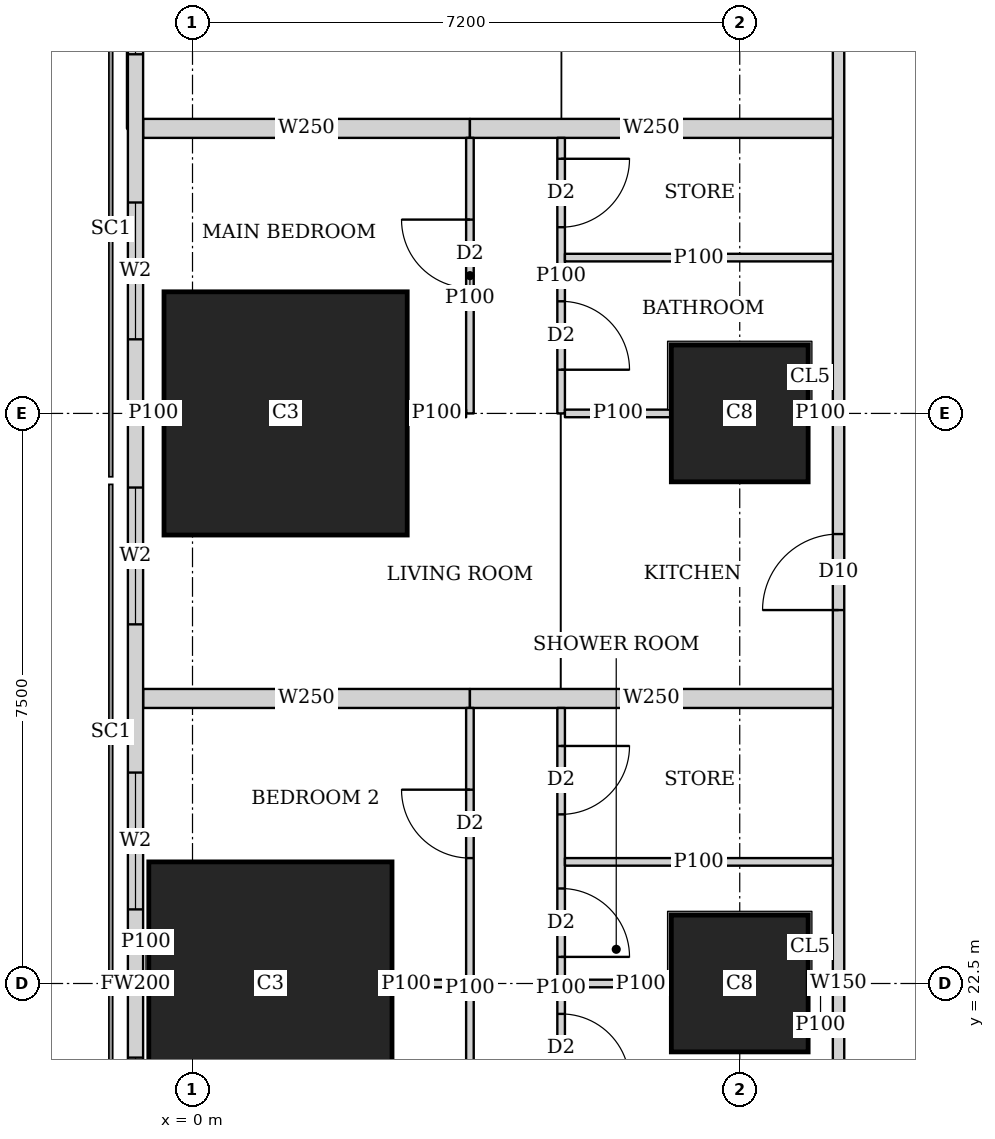
"""IFC4 building model, lengths in metres.
Left out: names, types, materials, properties, quantities, classifications, styles, units other than length and angle.
Written with IfcOpenShell. Run it as: python <this file> out.ifc"""

import sys

from ifc_helpers import new_model, si_unit, direction, frame, frame_2d, origin, origin_2d, place, context, subcontext, project, spatial, rectangle, extrude, element, fill, save


model = new_model("IFC4")
c1 = context("Model", 3, precision=1e-05, world=origin(), true_north=direction((0.0, 1.0)))
c2 = subcontext(c1, "Body", "Model", "MODEL_VIEW")
j1 = project(units=[si_unit("LENGTHUNIT", "METRE"), si_unit("PLANEANGLEUNIT", "RADIAN")], contexts=[c1])
p1 = place(None, origin())
s1 = spatial("IfcSite", under=j1, at=p1, CompositionType="ELEMENT")
p2 = place(p1, origin())
s2 = spatial("IfcBuilding", under=s1, at=p2, CompositionType="ELEMENT")
p3 = place(p2, frame((0.0, 0.0, 23.75)))
s3 = spatial("IfcBuildingStorey", under=s2, at=p3, CompositionType="ELEMENT", Elevation=23.75)
p4 = place(p3, frame((1.025, 22.5, 0.0), z_axis=(0.0, 0.0, 1.0), x_axis=(1.0, 0.0, 0.0)))
e1 = element("IfcColumn", 1, at=p4, inside=s3, PredefinedType="COLUMN", context=c2, shape_type="SweptSolid", body=[
    extrude(rectangle(XDim=3.2, YDim=3.2, at=origin_2d()), origin(), (0.0, 0.0, 1.0), 3.75),
])
p5 = place(p3, frame((7.2, 22.5, 0.0), z_axis=(0.0, 0.0, 1.0), x_axis=(1.0, 0.0, 0.0)))
e2 = element("IfcColumn", 2, at=p5, inside=s3, PredefinedType="COLUMN", context=c2, shape_type="SweptSolid", body=[
    extrude(rectangle(XDim=1.8, YDim=1.8, at=origin_2d()), origin(), (0.0, 0.0, 1.0), 3.75),
])
p6 = place(p3, frame((1.225, 30.0, 0.0), z_axis=(0.0, 0.0, 1.0), x_axis=(1.0, 0.0, 0.0)))
e3 = element("IfcColumn", 3, at=p6, inside=s3, PredefinedType="COLUMN", context=c2, shape_type="SweptSolid", body=[
    extrude(rectangle(XDim=3.2, YDim=3.2, at=origin_2d()), origin(), (0.0, 0.0, 1.0), 3.75),
])
p7 = place(p3, frame((7.2, 30.0, 0.0), z_axis=(0.0, 0.0, 1.0), x_axis=(1.0, 0.0, 0.0)))
e4 = element("IfcColumn", 4, at=p7, inside=s3, PredefinedType="COLUMN", context=c2, shape_type="SweptSolid", body=[
    extrude(rectangle(XDim=1.8, YDim=1.8, at=origin_2d()), origin(), (0.0, 0.0, 1.0), 3.75),
])
p8 = place(p3, frame((-0.75, 42.837, 0.0), z_axis=(0.0, 0.0, 1.0), x_axis=(0.0, -1.0, 0.0)))
e5 = element("IfcWall", 5, at=p8, inside=s3, PredefinedType="SOLIDWALL", context=c2, shape_type="SweptSolid", body=[
    extrude(rectangle(XDim=40.674, YDim=0.2, at=frame_2d((20.337, 0.0))), origin(), (0.0, 0.0, 1.0), 3.5),
])
p9 = place(p8, frame((1.78, 0.0, 0.9)))
e6 = element("IfcOpeningElement", 6, at=p9, cuts=e5, PredefinedType="OPENING", context=c2, shape_type="SweptSolid", body=[
    extrude(rectangle(XDim=1.8, YDim=1.5, at=frame_2d((0.9, 0.75))), frame((0.0, 0.11, 0.0), z_axis=(0.0, -1.0, 0.0), x_axis=(1.0, 0.0, 0.0)), (0.0, 0.0, 1.0), 0.22),
])
p10 = place(p8, frame((6.312, 0.0, 0.9)))
e7 = element("IfcOpeningElement", 7, at=p10, cuts=e5, PredefinedType="OPENING", context=c2, shape_type="SweptSolid", body=[
    extrude(rectangle(XDim=1.8, YDim=1.5, at=frame_2d((0.9, 0.75))), frame((0.0, 0.11, 0.0), z_axis=(0.0, -1.0, 0.0), x_axis=(1.0, 0.0, 0.0)), (0.0, 0.0, 1.0), 0.22),
])
p11 = place(p8, frame((10.062, 0.0, 0.9)))
e8 = element("IfcOpeningElement", 8, at=p11, cuts=e5, PredefinedType="OPENING", context=c2, shape_type="SweptSolid", body=[
    extrude(rectangle(XDim=1.8, YDim=1.5, at=frame_2d((0.9, 0.75))), frame((0.0, 0.11, 0.0), z_axis=(0.0, -1.0, 0.0), x_axis=(1.0, 0.0, 0.0)), (0.0, 0.0, 1.0), 0.22),
])
p12 = place(p8, frame((13.812, 0.0, 0.9)))
e9 = element("IfcOpeningElement", 9, at=p12, cuts=e5, PredefinedType="OPENING", context=c2, shape_type="SweptSolid", body=[
    extrude(rectangle(XDim=1.8, YDim=1.5, at=frame_2d((0.9, 0.75))), frame((0.0, 0.11, 0.0), z_axis=(0.0, -1.0, 0.0), x_axis=(1.0, 0.0, 0.0)), (0.0, 0.0, 1.0), 0.22),
])
p13 = place(p8, frame((17.562, 0.0, 0.9)))
e10 = element("IfcOpeningElement", 10, at=p13, cuts=e5, PredefinedType="OPENING", context=c2, shape_type="SweptSolid", body=[
    extrude(rectangle(XDim=1.8, YDim=1.5, at=frame_2d((0.9, 0.75))), frame((0.0, 0.11, 0.0), z_axis=(0.0, -1.0, 0.0), x_axis=(1.0, 0.0, 0.0)), (0.0, 0.0, 1.0), 0.22),
])
p14 = place(p8, frame((21.312, 0.0, 0.9)))
e11 = element("IfcOpeningElement", 11, at=p14, cuts=e5, PredefinedType="OPENING", context=c2, shape_type="SweptSolid", body=[
    extrude(rectangle(XDim=1.8, YDim=1.5, at=frame_2d((0.9, 0.75))), frame((0.0, 0.11, 0.0), z_axis=(0.0, -1.0, 0.0), x_axis=(1.0, 0.0, 0.0)), (0.0, 0.0, 1.0), 0.22),
])
p15 = place(p8, frame((25.062, 0.0, 0.9)))
e12 = element("IfcOpeningElement", 12, at=p15, cuts=e5, PredefinedType="OPENING", context=c2, shape_type="SweptSolid", body=[
    extrude(rectangle(XDim=1.8, YDim=1.5, at=frame_2d((0.9, 0.75))), frame((0.0, 0.11, 0.0), z_axis=(0.0, -1.0, 0.0), x_axis=(1.0, 0.0, 0.0)), (0.0, 0.0, 1.0), 0.22),
])
p16 = place(p8, frame((28.812, 0.0, 0.9)))
e13 = element("IfcOpeningElement", 13, at=p16, cuts=e5, PredefinedType="OPENING", context=c2, shape_type="SweptSolid", body=[
    extrude(rectangle(XDim=1.8, YDim=1.5, at=frame_2d((0.9, 0.75))), frame((0.0, 0.11, 0.0), z_axis=(0.0, -1.0, 0.0), x_axis=(1.0, 0.0, 0.0)), (0.0, 0.0, 1.0), 0.22),
])
p17 = place(p8, frame((32.562, 0.0, 0.9)))
e14 = element("IfcOpeningElement", 14, at=p17, cuts=e5, PredefinedType="OPENING", context=c2, shape_type="SweptSolid", body=[
    extrude(rectangle(XDim=1.8, YDim=1.5, at=frame_2d((0.9, 0.75))), frame((0.0, 0.11, 0.0), z_axis=(0.0, -1.0, 0.0), x_axis=(1.0, 0.0, 0.0)), (0.0, 0.0, 1.0), 0.22),
])
p18 = place(p8, frame((37.094, 0.0, 0.9)))
e15 = element("IfcOpeningElement", 15, at=p18, cuts=e5, PredefinedType="OPENING", context=c2, shape_type="SweptSolid", body=[
    extrude(rectangle(XDim=1.8, YDim=1.5, at=frame_2d((0.9, 0.75))), frame((0.0, 0.11, 0.0), z_axis=(0.0, -1.0, 0.0), x_axis=(1.0, 0.0, 0.0)), (0.0, 0.0, 1.0), 0.22),
])
p19 = place(p3, frame((8.5, 2.626, 0.0), z_axis=(0.0, 0.0, 1.0), x_axis=(0.0, 1.0, 0.0)))
e16 = element("IfcWall", 16, at=p19, inside=s3, PredefinedType="SOLIDWALL", context=c2, shape_type="SweptSolid", body=[
    extrude(rectangle(XDim=39.773, YDim=0.15, at=frame_2d((19.886, 0.0))), origin(), (0.0, 0.0, 1.0), 2.05),
])
p20 = place(p19, frame((9.786, 0.0, 0.0)))
e17 = element("IfcOpeningElement", 17, at=p20, cuts=e16, PredefinedType="OPENING", context=c2, shape_type="SweptSolid", body=[
    extrude(rectangle(XDim=1.0, YDim=2.0, at=frame_2d((0.5, 1.0))), frame((0.0, 0.085, 0.0), z_axis=(0.0, -1.0, 0.0), x_axis=(1.0, 0.0, 0.0)), (0.0, 0.0, 1.0), 0.17),
])
p21 = place(p19, frame((13.961, 0.0, 0.0)))
e18 = element("IfcOpeningElement", 18, at=p21, cuts=e16, PredefinedType="OPENING", context=c2, shape_type="SweptSolid", body=[
    extrude(rectangle(XDim=1.0, YDim=2.0, at=frame_2d((0.5, 1.0))), frame((0.0, 0.085, 0.0), z_axis=(0.0, -1.0, 0.0), x_axis=(1.0, 0.0, 0.0)), (0.0, 0.0, 1.0), 0.17),
])
p22 = place(p19, frame((24.787, 0.0, 0.0)))
e19 = element("IfcOpeningElement", 19, at=p22, cuts=e16, PredefinedType="OPENING", context=c2, shape_type="SweptSolid", body=[
    extrude(rectangle(XDim=1.0, YDim=2.0, at=frame_2d((0.5, 1.0))), frame((0.0, 0.085, 0.0), z_axis=(0.0, -1.0, 0.0), x_axis=(1.0, 0.0, 0.0)), (0.0, 0.0, 1.0), 0.17),
])
p23 = place(p19, frame((32.287, 0.0, 0.0)))
e20 = element("IfcOpeningElement", 20, at=p23, cuts=e16, PredefinedType="OPENING", context=c2, shape_type="SweptSolid", body=[
    extrude(rectangle(XDim=1.0, YDim=2.0, at=frame_2d((0.5, 1.0))), frame((0.0, 0.085, 0.0), z_axis=(0.0, -1.0, 0.0), x_axis=(1.0, 0.0, 0.0)), (0.0, 0.0, 1.0), 0.17),
])
p24 = place(p3, frame((3.65, 18.75, 0.0), z_axis=(0.0, 0.0, 1.0), x_axis=(0.0, 1.0, 0.0)))
e21 = element("IfcWall", 21, at=p24, inside=s3, PredefinedType="PARTITIONING", context=c2, shape_type="SweptSolid", body=[
    extrude(rectangle(XDim=7.375, YDim=0.1, at=frame_2d((3.688, 0.0))), origin(), (0.0, 0.0, 1.0), 3.5),
])
p25 = place(p24, frame((0.2, 0.0, 0.0)))
e22 = element("IfcOpeningElement", 22, at=p25, cuts=e21, PredefinedType="OPENING", context=c2, shape_type="SweptSolid", body=[
    extrude(rectangle(XDim=0.9, YDim=2.1, at=frame_2d((0.45, 1.05))), frame((0.0, 0.06, 0.0), z_axis=(0.0, -1.0, 0.0), x_axis=(1.0, 0.0, 0.0)), (0.0, 0.0, 1.0), 0.12),
])
p26 = place(p24, frame((5.4, 0.0, 0.0)))
e23 = element("IfcOpeningElement", 23, at=p26, cuts=e21, PredefinedType="OPENING", context=c2, shape_type="SweptSolid", body=[
    extrude(rectangle(XDim=0.9, YDim=2.1, at=frame_2d((0.45, 1.05))), frame((0.0, 0.06, 0.0), z_axis=(0.0, -1.0, 0.0), x_axis=(1.0, 0.0, 0.0)), (0.0, 0.0, 1.0), 0.12),
])
p27 = place(p3, frame((4.85, 18.75, 0.0), z_axis=(0.0, 0.0, 1.0), x_axis=(0.0, 1.0, 0.0)))
e24 = element("IfcWall", 24, at=p27, inside=s3, PredefinedType="PARTITIONING", context=c2, shape_type="SweptSolid", body=[
    extrude(rectangle(XDim=7.375, YDim=0.1, at=frame_2d((3.688, 0.0))), origin(), (0.0, 0.0, 1.0), 3.5),
])
p28 = place(p27, frame((0.575, 0.0, 0.0)))
e25 = element("IfcOpeningElement", 25, at=p28, cuts=e24, PredefinedType="OPENING", context=c2, shape_type="SweptSolid", body=[
    extrude(rectangle(XDim=0.9, YDim=2.1, at=frame_2d((0.45, 1.05))), frame((0.0, 0.06, 0.0), z_axis=(0.0, -1.0, 0.0), x_axis=(1.0, 0.0, 0.0)), (0.0, 0.0, 1.0), 0.12),
])
p29 = place(p27, frame((4.1, 0.0, 0.0)))
e26 = element("IfcOpeningElement", 26, at=p29, cuts=e24, PredefinedType="OPENING", context=c2, shape_type="SweptSolid", body=[
    extrude(rectangle(XDim=0.9, YDim=2.1, at=frame_2d((0.45, 1.05))), frame((0.0, 0.06, 0.0), z_axis=(0.0, -1.0, 0.0), x_axis=(1.0, 0.0, 0.0)), (0.0, 0.0, 1.0), 0.12),
])
p30 = place(p27, frame((2.45, 0.0, 0.0)))
e27 = element("IfcOpeningElement", 27, at=p30, cuts=e24, PredefinedType="OPENING", context=c2, shape_type="SweptSolid", body=[
    extrude(rectangle(XDim=0.9, YDim=2.1, at=frame_2d((0.45, 1.05))), frame((0.0, 0.06, 0.0), z_axis=(0.0, -1.0, 0.0), x_axis=(1.0, 0.0, 0.0)), (0.0, 0.0, 1.0), 0.12),
])
p31 = place(p27, frame((5.975, 0.0, 0.0)))
e28 = element("IfcOpeningElement", 28, at=p31, cuts=e24, PredefinedType="OPENING", context=c2, shape_type="SweptSolid", body=[
    extrude(rectangle(XDim=0.9, YDim=2.1, at=frame_2d((0.45, 1.05))), frame((0.0, 0.06, 0.0), z_axis=(0.0, -1.0, 0.0), x_axis=(1.0, 0.0, 0.0)), (0.0, 0.0, 1.0), 0.12),
])
p32 = place(p3, frame((-0.65, 22.5, 0.0), z_axis=(0.0, 0.0, 1.0), x_axis=(1.0, 0.0, 0.0)))
e29 = element("IfcWall", 29, at=p32, inside=s3, PredefinedType="PARTITIONING", context=c2, shape_type="SweptSolid", body=[
    extrude(rectangle(XDim=0.074, YDim=0.1, at=frame_2d((0.037, 0.0))), origin(), (0.0, 0.0, 1.0), 3.5),
])
p33 = place(p3, frame((2.626, 22.5, 0.0), z_axis=(0.0, 0.0, 1.0), x_axis=(1.0, 0.0, 0.0)))
e30 = element("IfcWall", 30, at=p33, inside=s3, PredefinedType="PARTITIONING", context=c2, shape_type="SweptSolid", body=[
    extrude(rectangle(XDim=0.974, YDim=0.1, at=frame_2d((0.487, 0.0))), origin(), (0.0, 0.0, 1.0), 3.5),
])
p34 = place(p3, frame((4.9, 22.5, 0.0), z_axis=(0.0, 0.0, 1.0), x_axis=(1.0, 0.0, 0.0)))
e31 = element("IfcWall", 31, at=p34, inside=s3, PredefinedType="PARTITIONING", context=c2, shape_type="SweptSolid", body=[
    extrude(rectangle(XDim=1.399, YDim=0.1, at=frame_2d((0.7, 0.0))), origin(), (0.0, 0.0, 1.0), 3.5),
])
p35 = place(p3, frame((8.101, 22.5, 0.0), z_axis=(0.0, 0.0, 1.0), x_axis=(1.0, 0.0, 0.0)))
e32 = element("IfcWall", 32, at=p35, inside=s3, PredefinedType="PARTITIONING", context=c2, shape_type="SweptSolid", body=[
    extrude(rectangle(XDim=0.324, YDim=0.1, at=frame_2d((0.162, 0.0))), origin(), (0.0, 0.0, 1.0), 3.5),
])
p36 = place(p3, frame((4.9, 24.1, 0.0), z_axis=(0.0, 0.0, 1.0), x_axis=(1.0, 0.0, 0.0)))
e33 = element("IfcWall", 33, at=p36, inside=s3, PredefinedType="PARTITIONING", context=c2, shape_type="SweptSolid", body=[
    extrude(rectangle(XDim=3.525, YDim=0.1, at=frame_2d((1.763, 0.0))), origin(), (0.0, 0.0, 1.0), 3.5),
])
p37 = place(p3, frame((3.65, 30.0, 0.0), z_axis=(0.0, 0.0, 1.0), x_axis=(0.0, 1.0, 0.0)))
e34 = element("IfcWall", 34, at=p37, inside=s3, PredefinedType="PARTITIONING", context=c2, shape_type="SweptSolid", body=[
    extrude(rectangle(XDim=3.625, YDim=0.1, at=frame_2d((1.812, 0.0))), origin(), (0.0, 0.0, 1.0), 3.5),
])
p38 = place(p37, frame((1.65, 0.0, 0.0)))
e35 = element("IfcOpeningElement", 35, at=p38, cuts=e34, PredefinedType="OPENING", context=c2, shape_type="SweptSolid", body=[
    extrude(rectangle(XDim=0.9, YDim=2.1, at=frame_2d((0.45, 1.05))), frame((0.0, 0.06, 0.0), z_axis=(0.0, -1.0, 0.0), x_axis=(1.0, 0.0, 0.0)), (0.0, 0.0, 1.0), 0.12),
])
p39 = place(p3, frame((4.85, 30.0, 0.0), z_axis=(0.0, 0.0, 1.0), x_axis=(0.0, 1.0, 0.0)))
e36 = element("IfcWall", 36, at=p39, inside=s3, PredefinedType="PARTITIONING", context=c2, shape_type="SweptSolid", body=[
    extrude(rectangle(XDim=3.625, YDim=0.1, at=frame_2d((1.812, 0.0))), origin(), (0.0, 0.0, 1.0), 3.5),
])
p40 = place(p39, frame((0.575, 0.0, 0.0)))
e37 = element("IfcOpeningElement", 37, at=p40, cuts=e36, PredefinedType="OPENING", context=c2, shape_type="SweptSolid", body=[
    extrude(rectangle(XDim=0.9, YDim=2.1, at=frame_2d((0.45, 1.05))), frame((0.0, 0.06, 0.0), z_axis=(0.0, -1.0, 0.0), x_axis=(1.0, 0.0, 0.0)), (0.0, 0.0, 1.0), 0.12),
])
p41 = place(p39, frame((2.45, 0.0, 0.0)))
e38 = element("IfcOpeningElement", 38, at=p41, cuts=e36, PredefinedType="OPENING", context=c2, shape_type="SweptSolid", body=[
    extrude(rectangle(XDim=0.9, YDim=2.1, at=frame_2d((0.45, 1.05))), frame((0.0, 0.06, 0.0), z_axis=(0.0, -1.0, 0.0), x_axis=(1.0, 0.0, 0.0)), (0.0, 0.0, 1.0), 0.12),
])
p42 = place(p3, frame((-0.65, 30.0, 0.0), z_axis=(0.0, 0.0, 1.0), x_axis=(1.0, 0.0, 0.0)))
e39 = element("IfcWall", 39, at=p42, inside=s3, PredefinedType="PARTITIONING", context=c2, shape_type="SweptSolid", body=[
    extrude(rectangle(XDim=0.274, YDim=0.1, at=frame_2d((0.137, 0.0))), origin(), (0.0, 0.0, 1.0), 3.5),
])
p43 = place(p3, frame((2.826, 30.0, 0.0), z_axis=(0.0, 0.0, 1.0), x_axis=(1.0, 0.0, 0.0)))
e40 = element("IfcWall", 40, at=p43, inside=s3, PredefinedType="PARTITIONING", context=c2, shape_type="SweptSolid", body=[
    extrude(rectangle(XDim=0.774, YDim=0.1, at=frame_2d((0.387, 0.0))), origin(), (0.0, 0.0, 1.0), 3.5),
])
p44 = place(p3, frame((4.9, 30.0, 0.0), z_axis=(0.0, 0.0, 1.0), x_axis=(1.0, 0.0, 0.0)))
e41 = element("IfcWall", 41, at=p44, inside=s3, PredefinedType="PARTITIONING", context=c2, shape_type="SweptSolid", body=[
    extrude(rectangle(XDim=1.399, YDim=0.1, at=frame_2d((0.7, 0.0))), origin(), (0.0, 0.0, 1.0), 3.5),
])
p45 = place(p3, frame((8.101, 30.0, 0.0), z_axis=(0.0, 0.0, 1.0), x_axis=(1.0, 0.0, 0.0)))
e42 = element("IfcWall", 42, at=p45, inside=s3, PredefinedType="PARTITIONING", context=c2, shape_type="SweptSolid", body=[
    extrude(rectangle(XDim=0.324, YDim=0.1, at=frame_2d((0.162, 0.0))), origin(), (0.0, 0.0, 1.0), 3.5),
])
p46 = place(p3, frame((4.9, 32.05, 0.0), z_axis=(0.0, 0.0, 1.0), x_axis=(1.0, 0.0, 0.0)))
e43 = element("IfcWall", 43, at=p46, inside=s3, PredefinedType="PARTITIONING", context=c2, shape_type="SweptSolid", body=[
    extrude(rectangle(XDim=3.525, YDim=0.1, at=frame_2d((1.763, 0.0))), origin(), (0.0, 0.0, 1.0), 3.5),
])
p47 = place(p3, frame((-0.65, 26.25, 0.0), z_axis=(0.0, 0.0, 1.0), x_axis=(1.0, 0.0, 0.0)))
e44 = element("IfcWall", 44, at=p47, inside=s3, PredefinedType="SOLIDWALL", context=c2, shape_type="SweptSolid", body=[
    extrude(rectangle(XDim=4.3, YDim=0.25, at=frame_2d((2.15, 0.0))), origin(), (0.0, 0.0, 1.0), 2.05),
])
p48 = place(p3, frame((3.65, 26.25, 0.0), z_axis=(0.0, 0.0, 1.0), x_axis=(1.0, 0.0, 0.0)))
e45 = element("IfcWall", 45, at=p48, inside=s3, PredefinedType="SOLIDWALL", context=c2, shape_type="SweptSolid", body=[
    extrude(rectangle(XDim=4.775, YDim=0.25, at=frame_2d((2.388, 0.0))), origin(), (0.0, 0.0, 1.0), 3.5),
])
p49 = place(p3, frame((-0.65, 33.75, 0.0), z_axis=(0.0, 0.0, 1.0), x_axis=(1.0, 0.0, 0.0)))
e46 = element("IfcWall", 46, at=p49, inside=s3, PredefinedType="SOLIDWALL", context=c2, shape_type="SweptSolid", body=[
    extrude(rectangle(XDim=4.3, YDim=0.25, at=frame_2d((2.15, 0.0))), origin(), (0.0, 0.0, 1.0), 2.05),
])
p50 = place(p3, frame((3.65, 33.75, 0.0), z_axis=(0.0, 0.0, 1.0), x_axis=(1.0, 0.0, 0.0)))
e47 = element("IfcWall", 47, at=p50, inside=s3, PredefinedType="SOLIDWALL", context=c2, shape_type="SweptSolid", body=[
    extrude(rectangle(XDim=4.775, YDim=0.25, at=frame_2d((2.388, 0.0))), origin(), (0.0, 0.0, 1.0), 3.5),
])
p51 = place(p10, origin())
e48 = element("IfcWindow", 48, at=p51, inside=s3, PartitioningType="SINGLE_PANEL", PredefinedType="WINDOW", context=c2, shape_type="SweptSolid", body=[
    extrude(rectangle(XDim=1.8, YDim=1.5, at=frame_2d((0.9, 0.75))), frame((0.0, 0.03, 0.0), z_axis=(0.0, -1.0, 0.0), x_axis=(1.0, 0.0, 0.0)), (0.0, 0.0, 1.0), 0.06),
])
fill(e7, e48)
p52 = place(p11, origin())
e49 = element("IfcWindow", 49, at=p52, inside=s3, PartitioningType="SINGLE_PANEL", PredefinedType="WINDOW", context=c2, shape_type="SweptSolid", body=[
    extrude(rectangle(XDim=1.8, YDim=1.5, at=frame_2d((0.9, 0.75))), frame((0.0, 0.03, 0.0), z_axis=(0.0, -1.0, 0.0), x_axis=(1.0, 0.0, 0.0)), (0.0, 0.0, 1.0), 0.06),
])
fill(e8, e49)
p53 = place(p12, origin())
e50 = element("IfcWindow", 50, at=p53, inside=s3, PartitioningType="SINGLE_PANEL", PredefinedType="WINDOW", context=c2, shape_type="SweptSolid", body=[
    extrude(rectangle(XDim=1.8, YDim=1.5, at=frame_2d((0.9, 0.75))), frame((0.0, 0.03, 0.0), z_axis=(0.0, -1.0, 0.0), x_axis=(1.0, 0.0, 0.0)), (0.0, 0.0, 1.0), 0.06),
])
fill(e9, e50)
p54 = place(p13, origin())
e51 = element("IfcWindow", 51, at=p54, inside=s3, PartitioningType="SINGLE_PANEL", PredefinedType="WINDOW", context=c2, shape_type="SweptSolid", body=[
    extrude(rectangle(XDim=1.8, YDim=1.5, at=frame_2d((0.9, 0.75))), frame((0.0, 0.03, 0.0), z_axis=(0.0, -1.0, 0.0), x_axis=(1.0, 0.0, 0.0)), (0.0, 0.0, 1.0), 0.06),
])
fill(e10, e51)
p55 = place(p14, origin())
e52 = element("IfcWindow", 52, at=p55, inside=s3, PartitioningType="SINGLE_PANEL", PredefinedType="WINDOW", context=c2, shape_type="SweptSolid", body=[
    extrude(rectangle(XDim=1.8, YDim=1.5, at=frame_2d((0.9, 0.75))), frame((0.0, 0.03, 0.0), z_axis=(0.0, -1.0, 0.0), x_axis=(1.0, 0.0, 0.0)), (0.0, 0.0, 1.0), 0.06),
])
fill(e11, e52)
p56 = place(p26, origin())
e53 = element("IfcDoor", 53, at=p56, inside=s3, OperationType="SINGLE_SWING_RIGHT", PredefinedType="DOOR", context=c2, shape_type="SweptSolid", body=[
    extrude(rectangle(XDim=0.9, YDim=2.1, at=frame_2d((0.45, 1.05))), frame((0.0, 0.025, 0.0), z_axis=(0.0, -1.0, 0.0), x_axis=(1.0, 0.0, 0.0)), (0.0, 0.0, 1.0), 0.05),
])
fill(e23, e53)
p57 = place(p29, origin())
e54 = element("IfcDoor", 54, at=p57, inside=s3, OperationType="SINGLE_SWING_RIGHT", PredefinedType="DOOR", context=c2, shape_type="SweptSolid", body=[
    extrude(rectangle(XDim=0.9, YDim=2.1, at=frame_2d((0.45, 1.05))), frame((0.0, 0.025, 0.0), z_axis=(0.0, -1.0, 0.0), x_axis=(1.0, 0.0, 0.0)), (0.0, 0.0, 1.0), 0.05),
])
fill(e26, e54)
p58 = place(p30, origin())
e55 = element("IfcDoor", 55, at=p58, inside=s3, OperationType="SINGLE_SWING_RIGHT", PredefinedType="DOOR", context=c2, shape_type="SweptSolid", body=[
    extrude(rectangle(XDim=0.9, YDim=2.1, at=frame_2d((0.45, 1.05))), frame((0.0, 0.025, 0.0), z_axis=(0.0, -1.0, 0.0), x_axis=(1.0, 0.0, 0.0)), (0.0, 0.0, 1.0), 0.05),
])
fill(e27, e55)
p59 = place(p31, origin())
e56 = element("IfcDoor", 56, at=p59, inside=s3, OperationType="SINGLE_SWING_LEFT", PredefinedType="DOOR", context=c2, shape_type="SweptSolid", body=[
    extrude(rectangle(XDim=0.9, YDim=2.1, at=frame_2d((0.45, 1.05))), frame((0.0, 0.025, 0.0), z_axis=(0.0, -1.0, 0.0), x_axis=(1.0, 0.0, 0.0)), (0.0, 0.0, 1.0), 0.05),
])
fill(e28, e56)
p60 = place(p38, origin())
e57 = element("IfcDoor", 57, at=p60, inside=s3, OperationType="SINGLE_SWING_RIGHT", PredefinedType="DOOR", context=c2, shape_type="SweptSolid", body=[
    extrude(rectangle(XDim=0.9, YDim=2.1, at=frame_2d((0.45, 1.05))), frame((0.0, 0.025, 0.0), z_axis=(0.0, -1.0, 0.0), x_axis=(1.0, 0.0, 0.0)), (0.0, 0.0, 1.0), 0.05),
])
fill(e35, e57)
p61 = place(p40, origin())
e58 = element("IfcDoor", 58, at=p61, inside=s3, OperationType="SINGLE_SWING_RIGHT", PredefinedType="DOOR", context=c2, shape_type="SweptSolid", body=[
    extrude(rectangle(XDim=0.9, YDim=2.1, at=frame_2d((0.45, 1.05))), frame((0.0, 0.025, 0.0), z_axis=(0.0, -1.0, 0.0), x_axis=(1.0, 0.0, 0.0)), (0.0, 0.0, 1.0), 0.05),
])
fill(e37, e58)
p62 = place(p41, origin())
e59 = element("IfcDoor", 59, at=p62, inside=s3, OperationType="SINGLE_SWING_LEFT", PredefinedType="DOOR", context=c2, shape_type="SweptSolid", body=[
    extrude(rectangle(XDim=0.9, YDim=2.1, at=frame_2d((0.45, 1.05))), frame((0.0, 0.025, 0.0), z_axis=(0.0, -1.0, 0.0), x_axis=(1.0, 0.0, 0.0)), (0.0, 0.0, 1.0), 0.05),
])
fill(e38, e59)
p63 = place(p22, origin())
e60 = element("IfcDoor", 60, at=p63, inside=s3, OperationType="SINGLE_SWING_LEFT", PredefinedType="DOOR", context=c2, shape_type="SweptSolid", body=[
    extrude(rectangle(XDim=1.0, YDim=2.0, at=frame_2d((0.5, 1.0))), frame((0.0, 0.025, 0.0), z_axis=(0.0, -1.0, 0.0), x_axis=(1.0, 0.0, 0.0)), (0.0, 0.0, 1.0), 0.05),
])
fill(e19, e60)
save(model, sys.argv[1])
